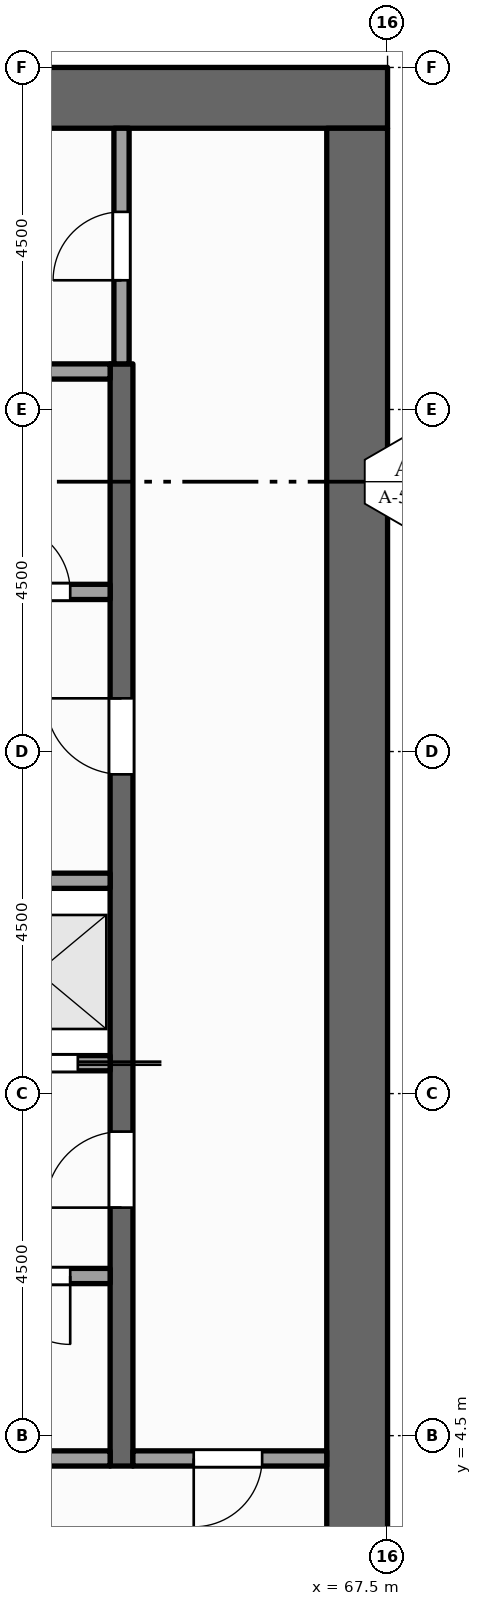
"""IFC4 building model, lengths in metres.
Left out: names, types, materials, properties, quantities, classifications, styles, units other than length and angle.
Written with IfcOpenShell. Run it as: python <this file> out.ifc"""

import sys

from ifc_helpers import new_model, si_unit, direction, frame, frame_2d, origin, place, context, subcontext, project, spatial, rectangle, extrude, element, fill, save


model = new_model("IFC4")
c1 = context("Model", 3, precision=1e-05, world=origin(), true_north=direction((0.0, 1.0)))
c2 = subcontext(c1, "Body", "Model", "MODEL_VIEW")
j1 = project(units=[si_unit("LENGTHUNIT", "METRE"), si_unit("PLANEANGLEUNIT", "RADIAN")], contexts=[c1])
p1 = place(None, origin())
s1 = spatial("IfcSite", under=j1, at=p1, CompositionType="ELEMENT")
p2 = place(p1, origin())
s2 = spatial("IfcBuilding", under=s1, at=p2, CompositionType="ELEMENT")
p3 = place(p2, frame((0.0, 0.0, 289.0)))
s3 = spatial("IfcBuildingStorey", under=s2, at=p3, CompositionType="ELEMENT", Elevation=289.0)
p4 = place(p3, frame((54.0, 22.1, -0.15), z_axis=(0.0, 0.0, 1.0), x_axis=(1.0, 0.0, 0.0)))
e1 = element("IfcWall", 1, at=p4, inside=s3, PredefinedType="SHEAR", context=c2, shape_type="SweptSolid", body=[
    extrude(rectangle(XDim=13.5, YDim=0.8, at=frame_2d((6.75, 0.0))), origin(), (0.0, 0.0, 1.0), 4.0),
])
p5 = place(p3, frame((67.1, 0.8, -0.15), z_axis=(0.0, 0.0, 1.0), x_axis=(0.0, 1.0, 0.0)))
e2 = element("IfcWall", 2, at=p5, inside=s3, PredefinedType="SHEAR", context=c2, shape_type="SweptSolid", body=[
    extrude(rectangle(XDim=20.9, YDim=0.8, at=frame_2d((10.45, 0.0))), origin(), (0.0, 0.0, 1.0), 4.0),
])
p6 = place(p3, frame((64.0, 4.1, 0.0), z_axis=(0.0, 0.0, 1.0), x_axis=(0.0, 1.0, 0.0)))
e3 = element("IfcWall", 3, at=p6, inside=s3, PredefinedType="SHEAR", context=c2, shape_type="SweptSolid", body=[
    extrude(rectangle(XDim=14.5, YDim=0.3, at=frame_2d((7.25, 0.0))), origin(), (0.0, 0.0, 1.0), 3.85),
])
p7 = place(p6, frame((3.4, 0.0, 0.0)))
e4 = element("IfcOpeningElement", 4, at=p7, cuts=e3, PredefinedType="OPENING", context=c2, shape_type="SweptSolid", body=[
    extrude(rectangle(XDim=1.0, YDim=2.1, at=frame_2d((0.5, 1.05))), frame((0.0, 0.16, 0.0), z_axis=(0.0, -1.0, 0.0), x_axis=(1.0, 0.0, 0.0)), (0.0, 0.0, 1.0), 0.32),
])
p8 = place(p6, frame((9.1, 0.0, 0.0)))
e5 = element("IfcOpeningElement", 5, at=p8, cuts=e3, PredefinedType="OPENING", context=c2, shape_type="SweptSolid", body=[
    extrude(rectangle(XDim=1.0, YDim=2.1, at=frame_2d((0.5, 1.05))), frame((0.0, 0.16, 0.0), z_axis=(0.0, -1.0, 0.0), x_axis=(1.0, 0.0, 0.0)), (0.0, 0.0, 1.0), 0.32),
])
p9 = place(p3, frame((64.0, 18.6, 0.0), z_axis=(0.0, 0.0, 1.0), x_axis=(0.0, 1.0, 0.0)))
e6 = element("IfcWall", 6, at=p9, inside=s3, PredefinedType="PARTITIONING", context=c2, shape_type="SweptSolid", body=[
    extrude(rectangle(XDim=3.1, YDim=0.2, at=frame_2d((1.55, 0.0))), origin(), (0.0, 0.0, 1.0), 3.85),
])
p10 = place(p9, frame((1.1, 0.0, 0.0)))
e7 = element("IfcOpeningElement", 7, at=p10, cuts=e6, PredefinedType="OPENING", context=c2, shape_type="SweptSolid", body=[
    extrude(rectangle(XDim=0.9, YDim=2.1, at=frame_2d((0.45, 1.05))), frame((0.0, 0.11, 0.0), z_axis=(0.0, -1.0, 0.0), x_axis=(1.0, 0.0, 0.0)), (0.0, 0.0, 1.0), 0.22),
])
p11 = place(p3, frame((61.9, 4.2, 0.0), z_axis=(0.0, 0.0, 1.0), x_axis=(1.0, 0.0, 0.0)))
e8 = element("IfcWall", 8, at=p11, inside=s3, PredefinedType="PARTITIONING", context=c2, shape_type="SweptSolid", body=[
    extrude(rectangle(XDim=1.95, YDim=0.2, at=frame_2d((0.975, 0.0))), origin(), (0.0, 0.0, 1.0), 3.85),
])
p12 = place(p3, frame((64.15, 4.2, 0.0), z_axis=(0.0, 0.0, 1.0), x_axis=(1.0, 0.0, 0.0)))
e9 = element("IfcWall", 9, at=p12, inside=s3, PredefinedType="PARTITIONING", context=c2, shape_type="SweptSolid", body=[
    extrude(rectangle(XDim=2.55, YDim=0.2, at=frame_2d((1.275, 0.0))), origin(), (0.0, 0.0, 1.0), 3.85),
])
p13 = place(p12, frame((0.8, 0.0, 0.0)))
e10 = element("IfcOpeningElement", 10, at=p13, cuts=e9, PredefinedType="OPENING", context=c2, shape_type="SweptSolid", body=[
    extrude(rectangle(XDim=0.9, YDim=2.1, at=frame_2d((0.45, 1.05))), frame((0.0, 0.11, 0.0), z_axis=(0.0, -1.0, 0.0), x_axis=(1.0, 0.0, 0.0)), (0.0, 0.0, 1.0), 0.22),
])
p14 = place(p3, frame((61.9, 6.6, 0.0), z_axis=(0.0, 0.0, 1.0), x_axis=(1.0, 0.0, 0.0)))
e11 = element("IfcWall", 11, at=p14, inside=s3, PredefinedType="PARTITIONING", context=c2, shape_type="SweptSolid", body=[
    extrude(rectangle(XDim=1.95, YDim=0.2, at=frame_2d((0.975, 0.0))), origin(), (0.0, 0.0, 1.0), 3.85),
])
p15 = place(p14, frame((0.525, 0.0, 0.0)))
e12 = element("IfcOpeningElement", 12, at=p15, cuts=e11, PredefinedType="OPENING", context=c2, shape_type="SweptSolid", body=[
    extrude(rectangle(XDim=0.9, YDim=2.1, at=frame_2d((0.45, 1.05))), frame((0.0, 0.11, 0.0), z_axis=(0.0, -1.0, 0.0), x_axis=(1.0, 0.0, 0.0)), (0.0, 0.0, 1.0), 0.22),
])
p16 = place(p3, frame((61.9, 9.4, 0.0), z_axis=(0.0, 0.0, 1.0), x_axis=(1.0, 0.0, 0.0)))
e13 = element("IfcWall", 13, at=p16, inside=s3, PredefinedType="SOLIDWALL", context=c2, shape_type="SweptSolid", body=[
    extrude(rectangle(XDim=1.95, YDim=0.2, at=frame_2d((0.975, 0.0))), origin(), (0.0, 0.0, 1.0), 3.85),
])
p17 = place(p16, frame((0.425, 0.0, 0.012)))
e14 = element("IfcOpeningElement", 14, at=p17, cuts=e13, PredefinedType="OPENING", context=c2, shape_type="SweptSolid", body=[
    extrude(rectangle(XDim=1.1, YDim=2.1, at=frame_2d((0.55, 1.05))), frame((0.0, 0.11, 0.0), z_axis=(0.0, -1.0, 0.0), x_axis=(1.0, 0.0, 0.0)), (0.0, 0.0, 1.0), 0.22),
])
p18 = place(p3, frame((61.9, 11.8, 0.0), z_axis=(0.0, 0.0, 1.0), x_axis=(1.0, 0.0, 0.0)))
e15 = element("IfcWall", 15, at=p18, inside=s3, PredefinedType="SOLIDWALL", context=c2, shape_type="SweptSolid", body=[
    extrude(rectangle(XDim=1.95, YDim=0.2, at=frame_2d((0.975, 0.0))), origin(), (0.0, 0.0, 1.0), 3.85),
])
p19 = place(p3, frame((61.9, 15.6, 0.0), z_axis=(0.0, 0.0, 1.0), x_axis=(1.0, 0.0, 0.0)))
e16 = element("IfcWall", 16, at=p19, inside=s3, PredefinedType="PARTITIONING", context=c2, shape_type="SweptSolid", body=[
    extrude(rectangle(XDim=1.95, YDim=0.2, at=frame_2d((0.975, 0.0))), origin(), (0.0, 0.0, 1.0), 3.85),
])
p20 = place(p19, frame((0.525, 0.0, 0.0)))
e17 = element("IfcOpeningElement", 17, at=p20, cuts=e16, PredefinedType="OPENING", context=c2, shape_type="SweptSolid", body=[
    extrude(rectangle(XDim=0.9, YDim=2.1, at=frame_2d((0.45, 1.05))), frame((0.0, 0.11, 0.0), z_axis=(0.0, -1.0, 0.0), x_axis=(1.0, 0.0, 0.0)), (0.0, 0.0, 1.0), 0.22),
])
p21 = place(p3, frame((61.9, 18.5, 0.0), z_axis=(0.0, 0.0, 1.0), x_axis=(1.0, 0.0, 0.0)))
e18 = element("IfcWall", 18, at=p21, inside=s3, PredefinedType="PARTITIONING", context=c2, shape_type="SweptSolid", body=[
    extrude(rectangle(XDim=1.95, YDim=0.2, at=frame_2d((0.975, 0.0))), origin(), (0.0, 0.0, 1.0), 3.85),
])
p22 = place(p17, origin())
e19 = element("IfcDoor", 19, at=p22, inside=s3, OperationType="SLIDING_TO_RIGHT", PredefinedType="DOOR", context=c2, shape_type="SweptSolid", body=[
    extrude(rectangle(XDim=1.1, YDim=2.1, at=frame_2d((0.55, 1.05))), frame((0.0, 0.025, 0.0), z_axis=(0.0, -1.0, 0.0), x_axis=(1.0, 0.0, 0.0)), (0.0, 0.0, 1.0), 0.05),
])
fill(e14, e19)
p23 = place(p7, origin())
e20 = element("IfcDoor", 20, at=p23, inside=s3, OperationType="SINGLE_SWING_LEFT", PredefinedType="DOOR", context=c2, shape_type="SweptSolid", body=[
    extrude(rectangle(XDim=1.0, YDim=2.1, at=frame_2d((0.5, 1.05))), frame((0.0, 0.025, 0.0), z_axis=(0.0, -1.0, 0.0), x_axis=(1.0, 0.0, 0.0)), (0.0, 0.0, 1.0), 0.05),
])
fill(e4, e20)
p24 = place(p8, origin())
e21 = element("IfcDoor", 21, at=p24, inside=s3, OperationType="SINGLE_SWING_RIGHT", PredefinedType="DOOR", context=c2, shape_type="SweptSolid", body=[
    extrude(rectangle(XDim=1.0, YDim=2.1, at=frame_2d((0.5, 1.05))), frame((0.0, 0.025, 0.0), z_axis=(0.0, -1.0, 0.0), x_axis=(1.0, 0.0, 0.0)), (0.0, 0.0, 1.0), 0.05),
])
fill(e5, e21)
p25 = place(p13, origin())
e22 = element("IfcDoor", 22, at=p25, inside=s3, OperationType="SINGLE_SWING_LEFT", PredefinedType="DOOR", context=c2, shape_type="SweptSolid", body=[
    extrude(rectangle(XDim=0.9, YDim=2.1, at=frame_2d((0.45, 1.05))), frame((0.0, 0.025, 0.0), z_axis=(0.0, -1.0, 0.0), x_axis=(1.0, 0.0, 0.0)), (0.0, 0.0, 1.0), 0.05),
])
fill(e10, e22)
p26 = place(p10, origin())
e23 = element("IfcDoor", 23, at=p26, inside=s3, OperationType="SINGLE_SWING_LEFT", PredefinedType="DOOR", context=c2, shape_type="SweptSolid", body=[
    extrude(rectangle(XDim=0.9, YDim=2.1, at=frame_2d((0.45, 1.05))), frame((0.0, 0.025, 0.0), z_axis=(0.0, -1.0, 0.0), x_axis=(1.0, 0.0, 0.0)), (0.0, 0.0, 1.0), 0.05),
])
fill(e7, e23)
p27 = place(p15, origin())
e24 = element("IfcDoor", 24, at=p27, inside=s3, OperationType="SINGLE_SWING_RIGHT", PredefinedType="DOOR", context=c2, shape_type="SweptSolid", body=[
    extrude(rectangle(XDim=0.9, YDim=2.1, at=frame_2d((0.45, 1.05))), frame((0.0, 0.025, 0.0), z_axis=(0.0, -1.0, 0.0), x_axis=(1.0, 0.0, 0.0)), (0.0, 0.0, 1.0), 0.05),
])
fill(e12, e24)
p28 = place(p20, origin())
e25 = element("IfcDoor", 25, at=p28, inside=s3, OperationType="SINGLE_SWING_LEFT", PredefinedType="DOOR", context=c2, shape_type="SweptSolid", body=[
    extrude(rectangle(XDim=0.9, YDim=2.1, at=frame_2d((0.45, 1.05))), frame((0.0, 0.025, 0.0), z_axis=(0.0, -1.0, 0.0), x_axis=(1.0, 0.0, 0.0)), (0.0, 0.0, 1.0), 0.05),
])
fill(e17, e25)
save(model, sys.argv[1])
